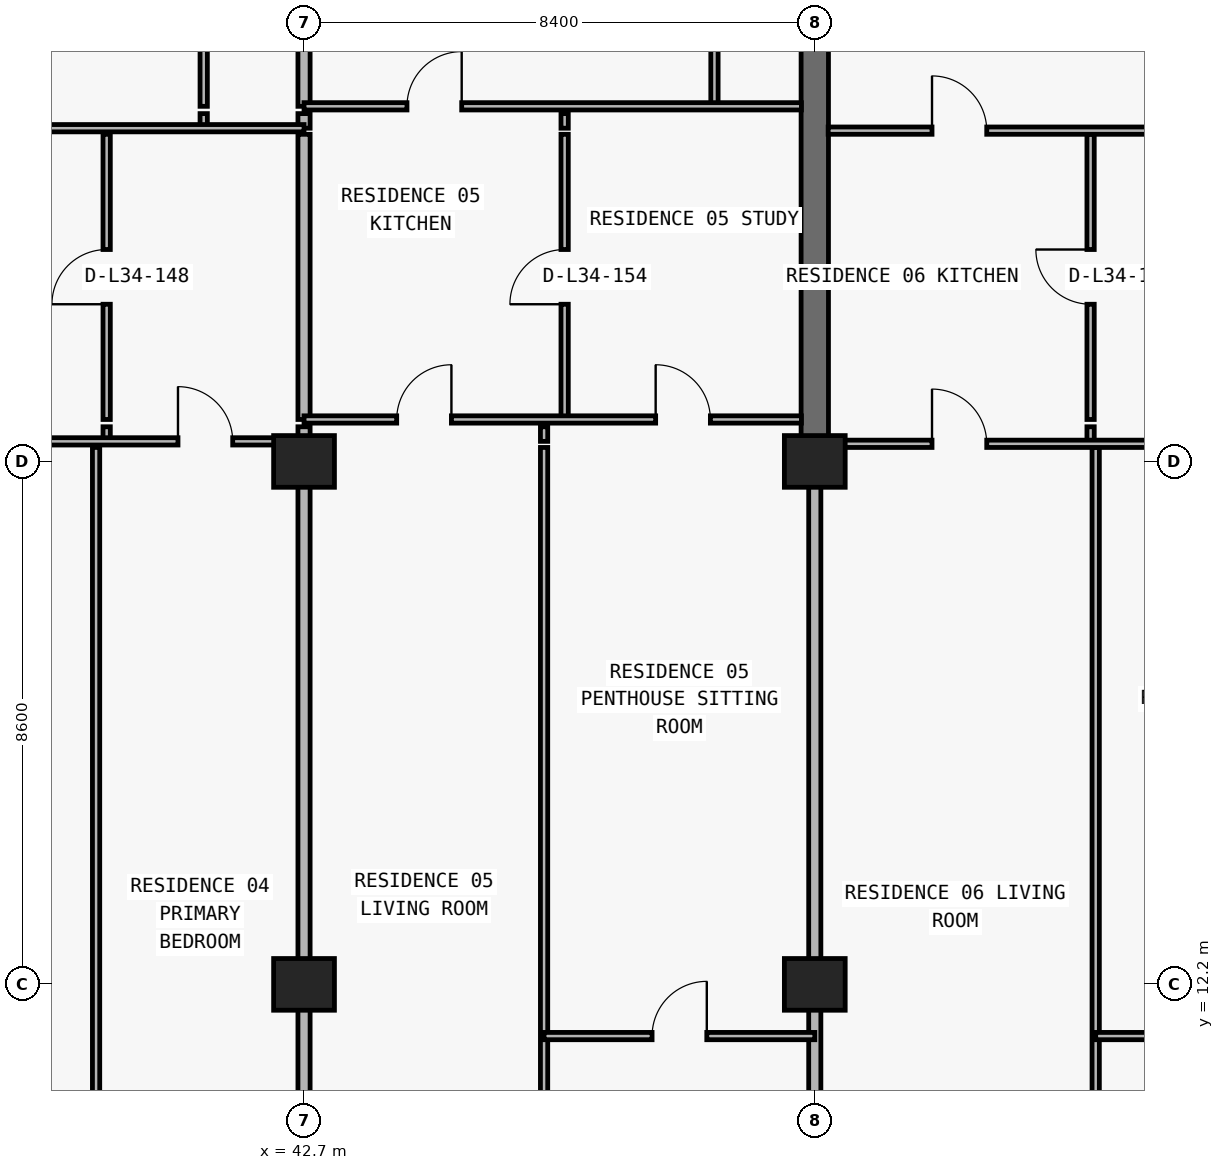
"""IFC4 building model, lengths in metres.
Left out: names, types, materials, properties, quantities, classifications, styles, units other than length and angle.
Written with IfcOpenShell. Run it as: python <this file> out.ifc"""

import sys

from ifc_helpers import new_model, si_unit, direction, frame, frame_2d, origin, origin_2d, place, context, subcontext, project, spatial, rectangle, extrude, element, fill, save


model = new_model("IFC4")
c1 = context("Model", 3, precision=1e-05, world=origin(), true_north=direction((0.0, 1.0)))
c2 = subcontext(c1, "Body", "Model", "MODEL_VIEW")
j1 = project(units=[si_unit("LENGTHUNIT", "METRE"), si_unit("PLANEANGLEUNIT", "RADIAN")], contexts=[c1])
p1 = place(None, origin())
s1 = spatial("IfcSite", under=j1, at=p1, CompositionType="ELEMENT")
p2 = place(p1, origin())
s2 = spatial("IfcBuilding", under=s1, at=p2, CompositionType="ELEMENT")
p3 = place(p2, frame((0.0, 0.0, 125.7)))
s3 = spatial("IfcBuildingStorey", under=s2, at=p3, CompositionType="ELEMENT", Elevation=125.7)
for number, where, z_axis, x_axis in (
    (1, (42.7, 12.2, 0.0), (0.0, 0.0, 1.0), (1.0, 0.0, 0.0)),
    (2, (51.1, 12.2, 0.0), (0.0, 0.0, 1.0), (1.0, 0.0, 0.0)),
    (3, (42.7, 20.8, 0.0), (0.0, 0.0, 1.0), (1.0, 0.0, 0.0)),
    (4, (51.1, 20.8, 0.0), (0.0, 0.0, 1.0), (1.0, 0.0, 0.0)),
):
    element("IfcColumn", number, at=place(p3, frame(where, z_axis=z_axis, x_axis=x_axis)), inside=s3, PredefinedType="COLUMN", context=c2, shape_type="SweptSolid", body=[
        extrude(rectangle(XDim=1.0, YDim=0.85, at=origin_2d()), origin(), (0.0, 0.0, 1.0), 3.05),
    ])
p4 = place(p3, frame((51.1, 20.8, 0.0), z_axis=(0.0, 0.0, 1.0), x_axis=(0.0, 1.0, 0.0)))
e5 = element("IfcWall", 5, at=p4, inside=s3, PredefinedType="SHEAR", context=c2, shape_type="SweptSolid", body=[
    extrude(rectangle(XDim=8.6, YDim=0.45, at=frame_2d((4.3, 0.0))), origin(), (0.0, 0.0, 1.0), 3.05),
])
p5 = place(p3, frame((39.28, 8.84, 0.0), z_axis=(0.0, 0.0, 1.0), x_axis=(0.0, 1.0, 0.0)))
e6 = element("IfcWall", 6, at=p5, inside=s3, PredefinedType="PARTITIONING", context=c2, shape_type="SweptSolid", body=[
    extrude(rectangle(XDim=12.19, YDim=0.12, at=frame_2d((6.095, 0.0))), origin(), (0.0, 0.0, 1.0), 3.05),
])
p6 = place(p3, frame((39.454, 21.13, 0.0), z_axis=(0.0, 0.0, 1.0), x_axis=(0.0, 1.0, 0.0)))
e7 = element("IfcWall", 7, at=p6, inside=s3, PredefinedType="PARTITIONING", context=c2, shape_type="SweptSolid", body=[
    extrude(rectangle(XDim=0.24, YDim=0.12, at=frame_2d((0.12, 0.0))), origin(), (0.0, 0.0, 1.0), 3.05),
])
p7 = place(p3, frame((39.454, 21.49, 0.0), z_axis=(0.0, 0.0, 1.0), x_axis=(0.0, 1.0, 0.0)))
e8 = element("IfcWall", 8, at=p7, inside=s3, PredefinedType="PARTITIONING", context=c2, shape_type="SweptSolid", body=[
    extrude(rectangle(XDim=4.69, YDim=0.12, at=frame_2d((2.345, 0.0))), origin(), (0.0, 0.0, 1.0), 3.05),
])
p8 = place(p7, frame((1.895, 0.0, 0.0)))
e9 = element("IfcOpeningElement", 9, at=p8, cuts=e8, PredefinedType="OPENING", context=c2, shape_type="SweptSolid", body=[
    extrude(rectangle(XDim=0.9, YDim=2.15, at=frame_2d((0.45, 1.075))), frame((0.0, 0.07, 0.0), z_axis=(0.0, -1.0, 0.0), x_axis=(1.0, 0.0, 0.0)), (0.0, 0.0, 1.0), 0.14),
])
p9 = place(p3, frame((41.05, 26.28, 0.0), z_axis=(0.0, 0.0, 1.0), x_axis=(0.0, 1.0, 0.0)))
e10 = element("IfcWall", 10, at=p9, inside=s3, PredefinedType="PARTITIONING", context=c2, shape_type="SweptSolid", body=[
    extrude(rectangle(XDim=0.24, YDim=0.12, at=frame_2d((0.12, 0.0))), origin(), (0.0, 0.0, 1.0), 3.05),
])
p10 = place(p3, frame((41.05, 26.64, 0.0), z_axis=(0.0, 0.0, 1.0), x_axis=(0.0, 1.0, 0.0)))
e11 = element("IfcWall", 11, at=p10, inside=s3, PredefinedType="PARTITIONING", context=c2, shape_type="SweptSolid", body=[
    extrude(rectangle(XDim=8.06, YDim=0.12, at=frame_2d((4.03, 0.0))), origin(), (0.0, 0.0, 1.0), 3.05),
])
p11 = place(p10, frame((3.755, 0.0, 0.0)))
e12 = element("IfcOpeningElement", 12, at=p11, cuts=e11, PredefinedType="OPENING", context=c2, shape_type="SweptSolid", body=[
    extrude(rectangle(XDim=0.85, YDim=2.1, at=frame_2d((0.425, 1.05))), frame((0.0, 0.07, 0.0), z_axis=(0.0, -1.0, 0.0), x_axis=(1.0, 0.0, 0.0)), (0.0, 0.0, 1.0), 0.14),
])
p12 = place(p3, frame((42.7, 8.84, 0.0), z_axis=(0.0, 0.0, 1.0), x_axis=(0.0, 1.0, 0.0)))
e13 = element("IfcWall", 13, at=p12, inside=s3, PredefinedType="PARTITIONING", context=c2, shape_type="SweptSolid", body=[
    extrude(rectangle(XDim=12.19, YDim=0.2, at=frame_2d((6.095, 0.0))), origin(), (0.0, 0.0, 1.0), 2.174),
])
p13 = place(p3, frame((42.7, 21.13, 0.0), z_axis=(0.0, 0.0, 1.0), x_axis=(0.0, 1.0, 0.0)))
e14 = element("IfcWall", 14, at=p13, inside=s3, PredefinedType="PARTITIONING", context=c2, shape_type="SweptSolid", body=[
    extrude(rectangle(XDim=0.24, YDim=0.2, at=frame_2d((0.12, 0.0))), origin(), (0.0, 0.0, 1.0), 2.174),
])
p14 = place(p3, frame((42.7, 21.49, 0.0), z_axis=(0.0, 0.0, 1.0), x_axis=(0.0, 1.0, 0.0)))
e15 = element("IfcWall", 15, at=p14, inside=s3, PredefinedType="PARTITIONING", context=c2, shape_type="SweptSolid", body=[
    extrude(rectangle(XDim=4.69, YDim=0.2, at=frame_2d((2.345, 0.0))), origin(), (0.0, 0.0, 1.0), 2.174),
])
p15 = place(p3, frame((42.7, 26.28, 0.0), z_axis=(0.0, 0.0, 1.0), x_axis=(0.0, 1.0, 0.0)))
e16 = element("IfcWall", 16, at=p15, inside=s3, PredefinedType="PARTITIONING", context=c2, shape_type="SweptSolid", body=[
    extrude(rectangle(XDim=0.24, YDim=0.2, at=frame_2d((0.12, 0.0))), origin(), (0.0, 0.0, 1.0), 2.174),
])
p16 = place(p3, frame((42.7, 26.64, 0.0), z_axis=(0.0, 0.0, 1.0), x_axis=(0.0, 1.0, 0.0)))
e17 = element("IfcWall", 17, at=p16, inside=s3, PredefinedType="PARTITIONING", context=c2, shape_type="SweptSolid", body=[
    extrude(rectangle(XDim=8.06, YDim=0.2, at=frame_2d((4.03, 0.0))), origin(), (0.0, 0.0, 1.0), 2.174),
])
p17 = place(p3, frame((46.648, 8.84, 0.0), z_axis=(0.0, 0.0, 1.0), x_axis=(0.0, 1.0, 0.0)))
e18 = element("IfcWall", 18, at=p17, inside=s3, PredefinedType="PARTITIONING", context=c2, shape_type="SweptSolid", body=[
    extrude(rectangle(XDim=12.19, YDim=0.12, at=frame_2d((6.095, 0.0))), origin(), (0.0, 0.0, 1.0), 3.05),
])
p18 = place(p3, frame((46.648, 21.13, 0.0), z_axis=(0.0, 0.0, 1.0), x_axis=(0.0, 1.0, 0.0)))
e19 = element("IfcWall", 19, at=p18, inside=s3, PredefinedType="PARTITIONING", context=c2, shape_type="SweptSolid", body=[
    extrude(rectangle(XDim=0.24, YDim=0.12, at=frame_2d((0.12, 0.0))), origin(), (0.0, 0.0, 1.0), 3.05),
])
p19 = place(p3, frame((46.986, 21.49, 0.0), z_axis=(0.0, 0.0, 1.0), x_axis=(0.0, 1.0, 0.0)))
e20 = element("IfcWall", 20, at=p19, inside=s3, PredefinedType="PARTITIONING", context=c2, shape_type="SweptSolid", body=[
    extrude(rectangle(XDim=4.69, YDim=0.12, at=frame_2d((2.345, 0.0))), origin(), (0.0, 0.0, 1.0), 3.05),
])
p20 = place(p19, frame((1.895, 0.0, 0.0)))
e21 = element("IfcOpeningElement", 21, at=p20, cuts=e20, PredefinedType="OPENING", context=c2, shape_type="SweptSolid", body=[
    extrude(rectangle(XDim=0.9, YDim=2.15, at=frame_2d((0.45, 1.075))), frame((0.0, 0.07, 0.0), z_axis=(0.0, -1.0, 0.0), x_axis=(1.0, 0.0, 0.0)), (0.0, 0.0, 1.0), 0.14),
])
p21 = place(p3, frame((46.986, 26.28, 0.0), z_axis=(0.0, 0.0, 1.0), x_axis=(0.0, 1.0, 0.0)))
e22 = element("IfcWall", 22, at=p21, inside=s3, PredefinedType="PARTITIONING", context=c2, shape_type="SweptSolid", body=[
    extrude(rectangle(XDim=0.24, YDim=0.12, at=frame_2d((0.12, 0.0))), origin(), (0.0, 0.0, 1.0), 3.05),
])
p22 = place(p3, frame((49.45, 26.64, 0.0), z_axis=(0.0, 0.0, 1.0), x_axis=(0.0, 1.0, 0.0)))
e23 = element("IfcWall", 23, at=p22, inside=s3, PredefinedType="PARTITIONING", context=c2, shape_type="SweptSolid", body=[
    extrude(rectangle(XDim=8.06, YDim=0.12, at=frame_2d((4.03, 0.0))), origin(), (0.0, 0.0, 1.0), 3.05),
])
p23 = place(p22, frame((3.755, 0.0, 0.0)))
e24 = element("IfcOpeningElement", 24, at=p23, cuts=e23, PredefinedType="OPENING", context=c2, shape_type="SweptSolid", body=[
    extrude(rectangle(XDim=0.85, YDim=2.1, at=frame_2d((0.425, 1.05))), frame((0.0, 0.07, 0.0), z_axis=(0.0, -1.0, 0.0), x_axis=(1.0, 0.0, 0.0)), (0.0, 0.0, 1.0), 0.14),
])
p24 = place(p3, frame((51.1, 8.84, 0.0), z_axis=(0.0, 0.0, 1.0), x_axis=(0.0, 1.0, 0.0)))
e25 = element("IfcWall", 25, at=p24, inside=s3, PredefinedType="PARTITIONING", context=c2, shape_type="SweptSolid", body=[
    extrude(rectangle(XDim=11.955, YDim=0.2, at=frame_2d((5.978, 0.0))), origin(), (0.0, 0.0, 1.0), 2.174),
])
p25 = place(p3, frame((55.636, 21.13, 0.0), z_axis=(0.0, 0.0, 1.0), x_axis=(0.0, 1.0, 0.0)))
e26 = element("IfcWall", 26, at=p25, inside=s3, PredefinedType="PARTITIONING", context=c2, shape_type="SweptSolid", body=[
    extrude(rectangle(XDim=0.24, YDim=0.12, at=frame_2d((0.12, 0.0))), origin(), (0.0, 0.0, 1.0), 3.05),
])
p26 = place(p3, frame((55.636, 21.49, 0.0), z_axis=(0.0, 0.0, 1.0), x_axis=(0.0, 1.0, 0.0)))
e27 = element("IfcWall", 27, at=p26, inside=s3, PredefinedType="PARTITIONING", context=c2, shape_type="SweptSolid", body=[
    extrude(rectangle(XDim=4.69, YDim=0.12, at=frame_2d((2.345, 0.0))), origin(), (0.0, 0.0, 1.0), 3.05),
])
p27 = place(p26, frame((1.895, 0.0, 0.0)))
e28 = element("IfcOpeningElement", 28, at=p27, cuts=e27, PredefinedType="OPENING", context=c2, shape_type="SweptSolid", body=[
    extrude(rectangle(XDim=0.9, YDim=2.15, at=frame_2d((0.45, 1.075))), frame((0.0, 0.07, 0.0), z_axis=(0.0, -1.0, 0.0), x_axis=(1.0, 0.0, 0.0)), (0.0, 0.0, 1.0), 0.14),
])
p28 = place(p3, frame((55.72, 8.84, 0.0), z_axis=(0.0, 0.0, 1.0), x_axis=(0.0, 1.0, 0.0)))
e29 = element("IfcWall", 29, at=p28, inside=s3, PredefinedType="PARTITIONING", context=c2, shape_type="SweptSolid", body=[
    extrude(rectangle(XDim=12.19, YDim=0.12, at=frame_2d((6.095, 0.0))), origin(), (0.0, 0.0, 1.0), 3.05),
])
p29 = place(p3, frame((46.648, 11.35, 0.0), z_axis=(0.0, 0.0, 1.0), x_axis=(1.0, 0.0, 0.0)))
e30 = element("IfcWall", 30, at=p29, inside=s3, PredefinedType="PARTITIONING", context=c2, shape_type="SweptSolid", body=[
    extrude(rectangle(XDim=4.452, YDim=0.12, at=frame_2d((2.226, 0.0))), origin(), (0.0, 0.0, 1.0), 3.05),
])
p30 = place(p29, frame((1.776, 0.0, 0.0)))
e31 = element("IfcOpeningElement", 31, at=p30, cuts=e30, PredefinedType="OPENING", context=c2, shape_type="SweptSolid", body=[
    extrude(rectangle(XDim=0.9, YDim=2.15, at=frame_2d((0.45, 1.075))), frame((0.0, 0.07, 0.0), z_axis=(0.0, -1.0, 0.0), x_axis=(1.0, 0.0, 0.0)), (0.0, 0.0, 1.0), 0.14),
])
p31 = place(p3, frame((55.72, 11.35, 0.0), z_axis=(0.0, 0.0, 1.0), x_axis=(1.0, 0.0, 0.0)))
e32 = element("IfcWall", 32, at=p31, inside=s3, PredefinedType="PARTITIONING", context=c2, shape_type="SweptSolid", body=[
    extrude(rectangle(XDim=3.78, YDim=0.12, at=frame_2d((1.89, 0.0))), origin(), (0.0, 0.0, 1.0), 3.05),
])
p32 = place(p31, frame((1.44, 0.0, 0.0)))
e33 = element("IfcOpeningElement", 33, at=p32, cuts=e32, PredefinedType="OPENING", context=c2, shape_type="SweptSolid", body=[
    extrude(rectangle(XDim=0.9, YDim=2.15, at=frame_2d((0.45, 1.075))), frame((0.0, 0.07, 0.0), z_axis=(0.0, -1.0, 0.0), x_axis=(1.0, 0.0, 0.0)), (0.0, 0.0, 1.0), 0.14),
])
p33 = place(p3, frame((51.32, 21.09, 0.0), z_axis=(0.0, 0.0, 1.0), x_axis=(1.0, 0.0, 0.0)))
e34 = element("IfcWall", 34, at=p33, inside=s3, PredefinedType="PARTITIONING", context=c2, shape_type="SweptSolid", body=[
    extrude(rectangle(XDim=8.18, YDim=0.12, at=frame_2d((4.09, 0.0))), origin(), (0.0, 0.0, 1.0), 2.174),
])
p34 = place(p33, frame((1.708, 0.0, 0.0)))
e35 = element("IfcOpeningElement", 35, at=p34, cuts=e34, PredefinedType="OPENING", context=c2, shape_type="SweptSolid", body=[
    extrude(rectangle(XDim=0.9, YDim=2.124, at=frame_2d((0.45, 1.062))), frame((0.0, 0.07, 0.0), z_axis=(0.0, -1.0, 0.0), x_axis=(1.0, 0.0, 0.0)), (0.0, 0.0, 1.0), 0.14),
])
p35 = place(p33, frame((5.84, 0.0, 0.0)))
e36 = element("IfcOpeningElement", 36, at=p35, cuts=e34, PredefinedType="OPENING", context=c2, shape_type="SweptSolid", body=[
    extrude(rectangle(XDim=0.9, YDim=2.124, at=frame_2d((0.45, 1.062))), frame((0.0, 0.07, 0.0), z_axis=(0.0, -1.0, 0.0), x_axis=(1.0, 0.0, 0.0)), (0.0, 0.0, 1.0), 0.14),
])
p36 = place(p3, frame((35.1, 21.13, 0.0), z_axis=(0.0, 0.0, 1.0), x_axis=(1.0, 0.0, 0.0)))
e37 = element("IfcWall", 37, at=p36, inside=s3, PredefinedType="PARTITIONING", context=c2, shape_type="SweptSolid", body=[
    extrude(rectangle(XDim=7.6, YDim=0.12, at=frame_2d((3.8, 0.0))), origin(), (0.0, 0.0, 1.0), 2.174),
])
p37 = place(p36, frame((1.64, 0.0, 0.0)))
e38 = element("IfcOpeningElement", 38, at=p37, cuts=e37, PredefinedType="OPENING", context=c2, shape_type="SweptSolid", body=[
    extrude(rectangle(XDim=0.9, YDim=2.124, at=frame_2d((0.45, 1.062))), frame((0.0, 0.07, 0.0), z_axis=(0.0, -1.0, 0.0), x_axis=(1.0, 0.0, 0.0)), (0.0, 0.0, 1.0), 0.14),
])
p38 = place(p36, frame((5.527, 0.0, 0.0)))
e39 = element("IfcOpeningElement", 39, at=p38, cuts=e37, PredefinedType="OPENING", context=c2, shape_type="SweptSolid", body=[
    extrude(rectangle(XDim=0.9, YDim=2.124, at=frame_2d((0.45, 1.062))), frame((0.0, 0.07, 0.0), z_axis=(0.0, -1.0, 0.0), x_axis=(1.0, 0.0, 0.0)), (0.0, 0.0, 1.0), 0.14),
])
p39 = place(p3, frame((42.7, 21.49, 0.0), z_axis=(0.0, 0.0, 1.0), x_axis=(1.0, 0.0, 0.0)))
e40 = element("IfcWall", 40, at=p39, inside=s3, PredefinedType="PARTITIONING", context=c2, shape_type="SweptSolid", body=[
    extrude(rectangle(XDim=8.18, YDim=0.12, at=frame_2d((4.09, 0.0))), origin(), (0.0, 0.0, 1.0), 3.05),
])
p40 = place(p39, frame((1.524, 0.0, 0.0)))
e41 = element("IfcOpeningElement", 41, at=p40, cuts=e40, PredefinedType="OPENING", context=c2, shape_type="SweptSolid", body=[
    extrude(rectangle(XDim=0.9, YDim=2.15, at=frame_2d((0.45, 1.075))), frame((0.0, 0.07, 0.0), z_axis=(0.0, -1.0, 0.0), x_axis=(1.0, 0.0, 0.0)), (0.0, 0.0, 1.0), 0.14),
])
p41 = place(p39, frame((5.783, 0.0, 0.0)))
e42 = element("IfcOpeningElement", 42, at=p41, cuts=e40, PredefinedType="OPENING", context=c2, shape_type="SweptSolid", body=[
    extrude(rectangle(XDim=0.9, YDim=2.15, at=frame_2d((0.45, 1.075))), frame((0.0, 0.07, 0.0), z_axis=(0.0, -1.0, 0.0), x_axis=(1.0, 0.0, 0.0)), (0.0, 0.0, 1.0), 0.14),
])
p42 = place(p3, frame((51.32, 26.24, 0.0), z_axis=(0.0, 0.0, 1.0), x_axis=(1.0, 0.0, 0.0)))
e43 = element("IfcWall", 43, at=p42, inside=s3, PredefinedType="PARTITIONING", context=c2, shape_type="SweptSolid", body=[
    extrude(rectangle(XDim=8.18, YDim=0.12, at=frame_2d((4.09, 0.0))), origin(), (0.0, 0.0, 1.0), 3.05),
])
p43 = place(p42, frame((1.708, 0.0, 0.0)))
e44 = element("IfcOpeningElement", 44, at=p43, cuts=e43, PredefinedType="OPENING", context=c2, shape_type="SweptSolid", body=[
    extrude(rectangle(XDim=0.9, YDim=2.15, at=frame_2d((0.45, 1.075))), frame((0.0, 0.07, 0.0), z_axis=(0.0, -1.0, 0.0), x_axis=(1.0, 0.0, 0.0)), (0.0, 0.0, 1.0), 0.14),
])
p44 = place(p3, frame((35.1, 26.28, 0.0), z_axis=(0.0, 0.0, 1.0), x_axis=(1.0, 0.0, 0.0)))
e45 = element("IfcWall", 45, at=p44, inside=s3, PredefinedType="PARTITIONING", context=c2, shape_type="SweptSolid", body=[
    extrude(rectangle(XDim=7.6, YDim=0.12, at=frame_2d((3.8, 0.0))), origin(), (0.0, 0.0, 1.0), 3.05),
])
p45 = place(p44, frame((1.727, 0.0, 0.0)))
e46 = element("IfcOpeningElement", 46, at=p45, cuts=e45, PredefinedType="OPENING", context=c2, shape_type="SweptSolid", body=[
    extrude(rectangle(XDim=0.9, YDim=2.15, at=frame_2d((0.45, 1.075))), frame((0.0, 0.07, 0.0), z_axis=(0.0, -1.0, 0.0), x_axis=(1.0, 0.0, 0.0)), (0.0, 0.0, 1.0), 0.14),
])
p46 = place(p3, frame((42.7, 26.64, 0.0), z_axis=(0.0, 0.0, 1.0), x_axis=(1.0, 0.0, 0.0)))
e47 = element("IfcWall", 47, at=p46, inside=s3, PredefinedType="PARTITIONING", context=c2, shape_type="SweptSolid", body=[
    extrude(rectangle(XDim=8.18, YDim=0.12, at=frame_2d((4.09, 0.0))), origin(), (0.0, 0.0, 1.0), 3.05),
])
p47 = place(p46, frame((1.693, 0.0, 0.0)))
e48 = element("IfcOpeningElement", 48, at=p47, cuts=e47, PredefinedType="OPENING", context=c2, shape_type="SweptSolid", body=[
    extrude(rectangle(XDim=0.9, YDim=2.15, at=frame_2d((0.45, 1.075))), frame((0.0, 0.07, 0.0), z_axis=(0.0, -1.0, 0.0), x_axis=(1.0, 0.0, 0.0)), (0.0, 0.0, 1.0), 0.14),
])
p48 = place(p8, origin())
e49 = element("IfcDoor", 49, at=p48, inside=s3, OperationType="SINGLE_SWING_LEFT", PredefinedType="DOOR", context=c2, shape_type="SweptSolid", body=[
    extrude(rectangle(XDim=0.9, YDim=2.15, at=frame_2d((0.45, 1.075))), frame((0.0, 0.025, 0.0), z_axis=(0.0, -1.0, 0.0), x_axis=(1.0, 0.0, 0.0)), (0.0, 0.0, 1.0), 0.05),
])
fill(e9, e49)
p49 = place(p38, origin())
e50 = element("IfcDoor", 50, at=p49, inside=s3, OperationType="SINGLE_SWING_LEFT", PredefinedType="DOOR", context=c2, shape_type="SweptSolid", body=[
    extrude(rectangle(XDim=0.9, YDim=2.124, at=frame_2d((0.45, 1.062))), frame((0.0, 0.025, 0.0), z_axis=(0.0, -1.0, 0.0), x_axis=(1.0, 0.0, 0.0)), (0.0, 0.0, 1.0), 0.05),
])
fill(e39, e50)
p50 = place(p47, origin())
e51 = element("IfcDoor", 51, at=p50, inside=s3, OperationType="SINGLE_SWING_RIGHT", PredefinedType="DOOR", context=c2, shape_type="SweptSolid", body=[
    extrude(rectangle(XDim=0.9, YDim=2.15, at=frame_2d((0.45, 1.075))), frame((0.0, 0.025, 0.0), z_axis=(0.0, -1.0, 0.0), x_axis=(1.0, 0.0, 0.0)), (0.0, 0.0, 1.0), 0.05),
])
fill(e48, e51)
p51 = place(p20, origin())
e52 = element("IfcDoor", 52, at=p51, inside=s3, OperationType="SINGLE_SWING_LEFT", PredefinedType="DOOR", context=c2, shape_type="SweptSolid", body=[
    extrude(rectangle(XDim=0.9, YDim=2.15, at=frame_2d((0.45, 1.075))), frame((0.0, 0.025, 0.0), z_axis=(0.0, -1.0, 0.0), x_axis=(1.0, 0.0, 0.0)), (0.0, 0.0, 1.0), 0.05),
])
fill(e21, e52)
p52 = place(p40, origin())
e53 = element("IfcDoor", 53, at=p52, inside=s3, OperationType="SINGLE_SWING_RIGHT", PredefinedType="DOOR", context=c2, shape_type="SweptSolid", body=[
    extrude(rectangle(XDim=0.9, YDim=2.15, at=frame_2d((0.45, 1.075))), frame((0.0, 0.025, 0.0), z_axis=(0.0, -1.0, 0.0), x_axis=(1.0, 0.0, 0.0)), (0.0, 0.0, 1.0), 0.05),
])
fill(e41, e53)
p53 = place(p41, origin())
e54 = element("IfcDoor", 54, at=p53, inside=s3, OperationType="SINGLE_SWING_LEFT", PredefinedType="DOOR", context=c2, shape_type="SweptSolid", body=[
    extrude(rectangle(XDim=0.9, YDim=2.15, at=frame_2d((0.45, 1.075))), frame((0.0, 0.025, 0.0), z_axis=(0.0, -1.0, 0.0), x_axis=(1.0, 0.0, 0.0)), (0.0, 0.0, 1.0), 0.05),
])
fill(e42, e54)
p54 = place(p30, origin())
e55 = element("IfcDoor", 55, at=p54, inside=s3, OperationType="SINGLE_SWING_RIGHT", PredefinedType="DOOR", context=c2, shape_type="SweptSolid", body=[
    extrude(rectangle(XDim=0.9, YDim=2.15, at=frame_2d((0.45, 1.075))), frame((0.0, 0.025, 0.0), z_axis=(0.0, -1.0, 0.0), x_axis=(1.0, 0.0, 0.0)), (0.0, 0.0, 1.0), 0.05),
])
fill(e31, e55)
p55 = place(p43, origin())
e56 = element("IfcDoor", 56, at=p55, inside=s3, OperationType="SINGLE_SWING_LEFT", PredefinedType="DOOR", context=c2, shape_type="SweptSolid", body=[
    extrude(rectangle(XDim=0.9, YDim=2.15, at=frame_2d((0.45, 1.075))), frame((0.0, 0.025, 0.0), z_axis=(0.0, -1.0, 0.0), x_axis=(1.0, 0.0, 0.0)), (0.0, 0.0, 1.0), 0.05),
])
fill(e44, e56)
p56 = place(p27, origin())
e57 = element("IfcDoor", 57, at=p56, inside=s3, OperationType="SINGLE_SWING_RIGHT", PredefinedType="DOOR", context=c2, shape_type="SweptSolid", body=[
    extrude(rectangle(XDim=0.9, YDim=2.15, at=frame_2d((0.45, 1.075))), frame((0.0, 0.025, 0.0), z_axis=(0.0, -1.0, 0.0), x_axis=(1.0, 0.0, 0.0)), (0.0, 0.0, 1.0), 0.05),
])
fill(e28, e57)
p57 = place(p34, origin())
e58 = element("IfcDoor", 58, at=p57, inside=s3, OperationType="SINGLE_SWING_LEFT", PredefinedType="DOOR", context=c2, shape_type="SweptSolid", body=[
    extrude(rectangle(XDim=0.9, YDim=2.124, at=frame_2d((0.45, 1.062))), frame((0.0, 0.025, 0.0), z_axis=(0.0, -1.0, 0.0), x_axis=(1.0, 0.0, 0.0)), (0.0, 0.0, 1.0), 0.05),
])
fill(e35, e58)
save(model, sys.argv[1])
